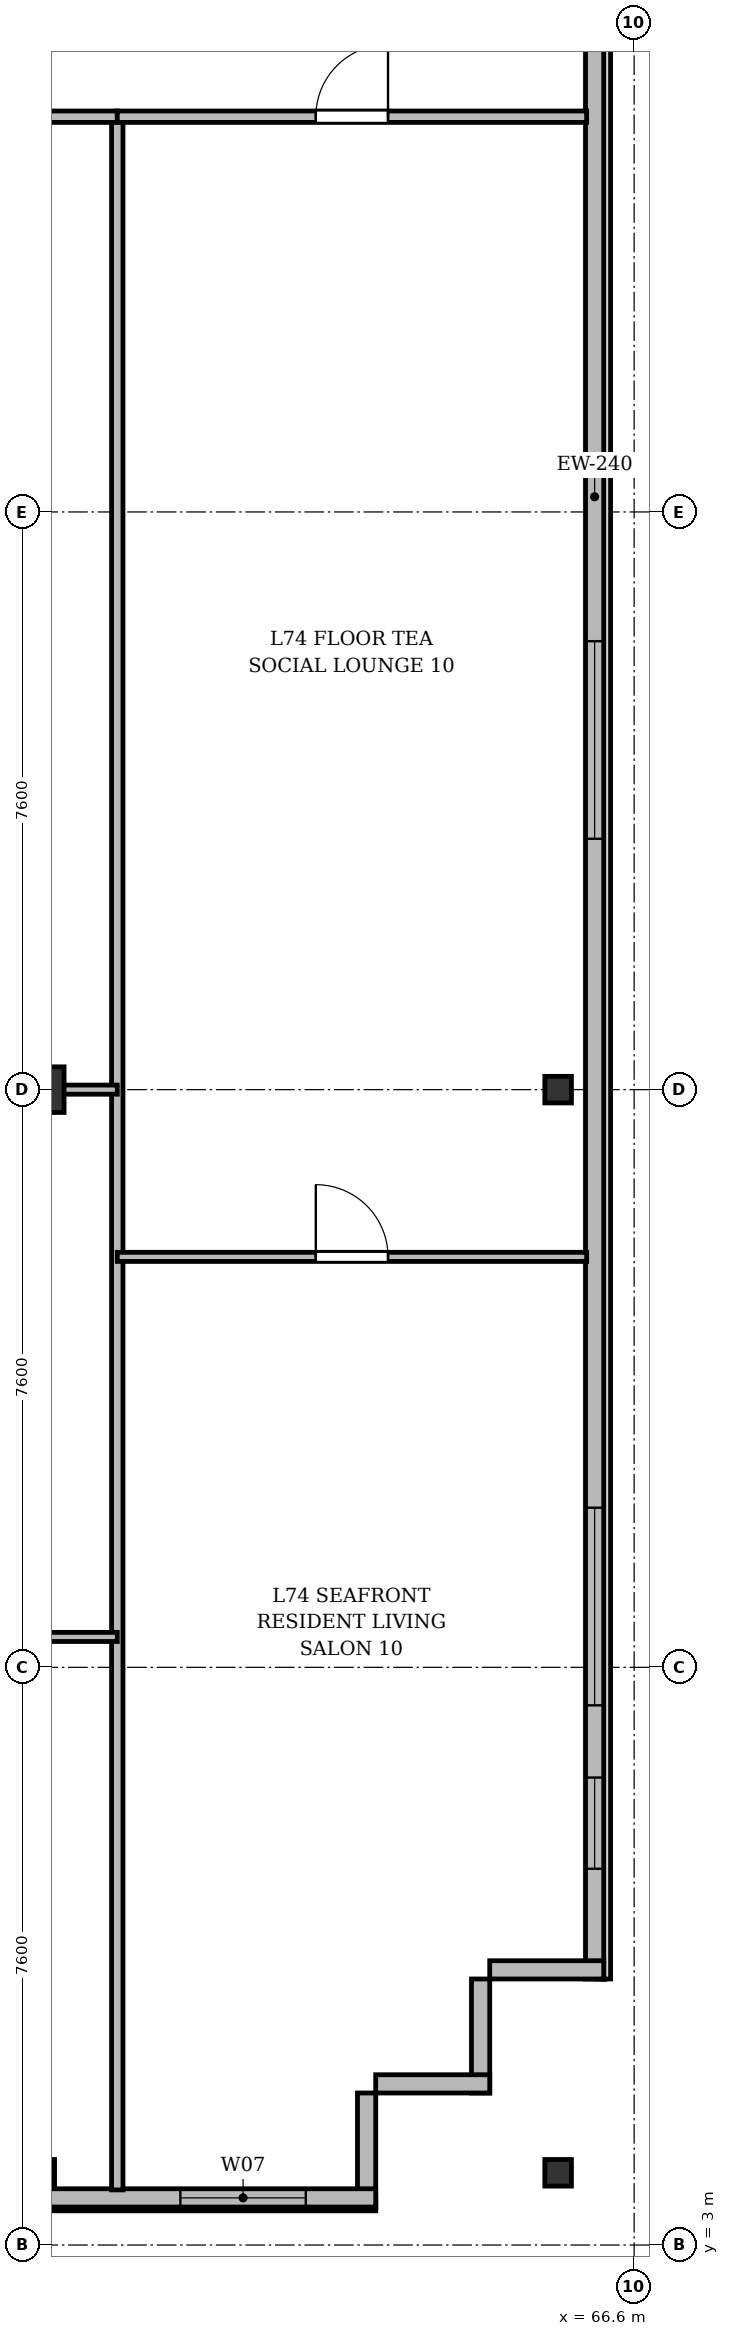
"""IFC4 building model, lengths in metres.
Left out: names, types, materials, properties, quantities, classifications, styles, units other than length and angle.
Written with IfcOpenShell. Run it as: python <this file> out.ifc"""

import sys

from ifc_helpers import new_model, si_unit, direction, frame, frame_2d, origin, origin_2d, place, context, subcontext, project, spatial, rectangle, i_section, extrude, source, transform, mapped, element, fill, save


model = new_model("IFC4")
c1 = context("Model", 3, precision=1e-05, world=origin(), true_north=direction((0.0, 1.0)))
c2 = subcontext(c1, "Body", "Model", "MODEL_VIEW")
j1 = project(units=[si_unit("LENGTHUNIT", "METRE"), si_unit("PLANEANGLEUNIT", "RADIAN")], contexts=[c1])
p1 = place(None, origin())
s1 = spatial("IfcSite", under=j1, at=p1, CompositionType="ELEMENT")
p2 = place(p1, origin())
s2 = spatial("IfcBuilding", under=s1, at=p2, CompositionType="ELEMENT")
p3 = place(p2, frame((0.0, 0.0, 284.7)))
s3 = spatial("IfcBuildingStorey", under=s2, at=p3, CompositionType="ELEMENT", Elevation=284.7)
m1 = source(origin(), c2, "Body", "SweptSolid", [
    extrude(i_section(OverallWidth=0.35, OverallDepth=0.35, WebThickness=0.018, FlangeThickness=0.028, at=origin_2d()), origin(), (0.0, 0.0, 1.0), 3.6),
])
p4 = place(p3, frame((58.8, 3.95, 0.0), z_axis=(0.0, 0.0, 1.0), x_axis=(1.0, 0.0, 0.0)))
e1 = element("IfcColumn", 1, at=p4, inside=s3, PredefinedType="COLUMN", context=c2, shape_type="MappedRepresentation", body=[
    mapped(m1, transform((0.0, 0.0, 0.0), x_axis=(1.0, 0.0, 0.0), y_axis=(0.0, 1.0, 0.0), z_axis=(0.0, 0.0, 1.0), scale=1.0)),
])
m2 = source(origin(), c2, "Body", "SweptSolid", [
    extrude(rectangle(XDim=0.6, YDim=0.6, at=origin_2d()), origin(), (0.0, 0.0, 1.0), 3.6),
])
p5 = place(p3, frame((58.8, 18.2, 0.0), z_axis=(0.0, 0.0, 1.0), x_axis=(1.0, 0.0, 0.0)))
e2 = element("IfcColumn", 2, at=p5, inside=s3, PredefinedType="COLUMN", context=c2, shape_type="MappedRepresentation", body=[
    mapped(m2, transform((0.0, 0.0, 0.0), x_axis=(1.0, 0.0, 0.0), y_axis=(0.0, 1.0, 0.0), z_axis=(0.0, 0.0, 1.0), scale=1.0)),
])
for number, where, z_axis, x_axis in (
    (3, (65.6, 3.95, 0.0), (0.0, 0.0, 1.0), (1.0, 0.0, 0.0)),
    (4, (65.6, 18.2, 0.0), (0.0, 0.0, 1.0), (1.0, 0.0, 0.0)),
):
    element("IfcColumn", number, at=place(p3, frame(where, z_axis=z_axis, x_axis=x_axis)), inside=s3, PredefinedType="COLUMN", context=c2, shape_type="MappedRepresentation", body=[
        mapped(m1, transform((0.0, 0.0, 0.0), x_axis=(1.0, 0.0, 0.0), y_axis=(0.0, 1.0, 0.0), z_axis=(0.0, 0.0, 1.0), scale=1.0)),
    ])
p6 = place(p3, frame((66.08, 45.5, 0.0), z_axis=(0.0, 0.0, 1.0), x_axis=(0.0, -1.0, 0.0)))
e5 = element("IfcWall", 5, at=p6, inside=s3, PredefinedType="SOLIDWALL", context=c2, shape_type="SweptSolid", body=[
    extrude(rectangle(XDim=39.0, YDim=0.24, at=frame_2d((19.5, 0.0))), origin(), (0.0, 0.0, 1.0), 3.37),
])
p7 = place(p6, frame((36.35, 0.0, 0.92)))
e6 = element("IfcOpeningElement", 6, at=p7, cuts=e5, PredefinedType="OPENING", context=c2, shape_type="SweptSolid", body=[
    extrude(rectangle(XDim=1.2, YDim=1.65, at=frame_2d((0.6, 0.825))), frame((0.0, 0.13, 0.0), z_axis=(0.0, -1.0, 0.0), x_axis=(1.0, 0.0, 0.0)), (0.0, 0.0, 1.0), 0.26),
])
p8 = place(p6, frame((32.8, 0.0, 0.92)))
e7 = element("IfcOpeningElement", 7, at=p8, cuts=e5, PredefinedType="OPENING", context=c2, shape_type="SweptSolid", body=[
    extrude(rectangle(XDim=2.6, YDim=1.9, at=frame_2d((1.3, 0.95))), frame((0.0, 0.13, 0.0), z_axis=(0.0, -1.0, 0.0), x_axis=(1.0, 0.0, 0.0)), (0.0, 0.0, 1.0), 0.26),
])
p9 = place(p6, frame((21.4, 0.0, 0.92)))
e8 = element("IfcOpeningElement", 8, at=p9, cuts=e5, PredefinedType="OPENING", context=c2, shape_type="SweptSolid", body=[
    extrude(rectangle(XDim=2.6, YDim=1.9, at=frame_2d((1.3, 0.95))), frame((0.0, 0.13, 0.0), z_axis=(0.0, -1.0, 0.0), x_axis=(1.0, 0.0, 0.0)), (0.0, 0.0, 1.0), 0.26),
])
p10 = place(p6, frame((7.4, 0.0, 0.92)))
e9 = element("IfcOpeningElement", 9, at=p10, cuts=e5, PredefinedType="OPENING", context=c2, shape_type="SweptSolid", body=[
    extrude(rectangle(XDim=2.6, YDim=1.9, at=frame_2d((1.3, 0.95))), frame((0.0, 0.13, 0.0), z_axis=(0.0, -1.0, 0.0), x_axis=(1.0, 0.0, 0.0)), (0.0, 0.0, 1.0), 0.26),
])
p11 = place(p6, frame((1.15, 0.0, 0.92)))
e10 = element("IfcOpeningElement", 10, at=p11, cuts=e5, PredefinedType="OPENING", context=c2, shape_type="SweptSolid", body=[
    extrude(rectangle(XDim=1.2, YDim=1.65, at=frame_2d((0.6, 0.825))), frame((0.0, 0.13, 0.0), z_axis=(0.0, -1.0, 0.0), x_axis=(1.0, 0.0, 0.0)), (0.0, 0.0, 1.0), 0.26),
])
p12 = place(p3, frame((66.2, 6.62, 0.0), z_axis=(0.0, 0.0, 1.0), x_axis=(-1.0, 0.0, 0.0)))
e11 = element("IfcWall", 11, at=p12, inside=s3, PredefinedType="SOLIDWALL", context=c2, shape_type="SweptSolid", body=[
    extrude(rectangle(XDim=1.5, YDim=0.24, at=frame_2d((0.75, 0.0))), origin(), (0.0, 0.0, 1.0), 2.87),
])
for number, where, z_axis, x_axis in (
    (12, (64.58, 6.5, 0.0), (0.0, 0.0, 1.0), (0.0, -1.0, 0.0)),
    (13, (64.7, 5.12, 0.0), (0.0, 0.0, 1.0), (-1.0, 0.0, 0.0)),
):
    element("IfcWall", number, at=place(p3, frame(where, z_axis=z_axis, x_axis=x_axis)), inside=s3, PredefinedType="SOLIDWALL", context=c2, shape_type="SweptSolid", body=[
        extrude(rectangle(XDim=1.5, YDim=0.24, at=frame_2d((0.75, 0.0))), origin(), (0.0, 0.0, 1.0), 3.37),
    ])
p13 = place(p3, frame((63.08, 5.0, 0.0), z_axis=(0.0, 0.0, 1.0), x_axis=(0.0, -1.0, 0.0)))
e14 = element("IfcWall", 14, at=p13, inside=s3, PredefinedType="SOLIDWALL", context=c2, shape_type="SweptSolid", body=[
    extrude(rectangle(XDim=1.5, YDim=0.24, at=frame_2d((0.75, 0.0))), origin(), (0.0, 0.0, 1.0), 2.92),
])
p14 = place(p3, frame((63.2, 3.62, 0.0), z_axis=(0.0, 0.0, 1.0), x_axis=(-1.0, 0.0, 0.0)))
e15 = element("IfcWall", 15, at=p14, inside=s3, PredefinedType="SOLIDWALL", context=c2, shape_type="SweptSolid", body=[
    extrude(rectangle(XDim=52.0, YDim=0.24, at=frame_2d((26.0, 0.0))), origin(), (0.0, 0.0, 1.0), 3.37),
])
p15 = place(p14, frame((0.92, 0.0, 0.9)))
e16 = element("IfcOpeningElement", 16, at=p15, cuts=e15, PredefinedType="OPENING", context=c2, shape_type="SweptSolid", body=[
    extrude(rectangle(XDim=1.65, YDim=1.85, at=frame_2d((0.825, 0.925))), frame((0.0, 0.13, 0.0), z_axis=(0.0, -1.0, 0.0), x_axis=(1.0, 0.0, 0.0)), (0.0, 0.0, 1.0), 0.26),
])
p16 = place(p14, frame((4.793, 0.0, 0.9)))
e17 = element("IfcOpeningElement", 17, at=p16, cuts=e15, PredefinedType="OPENING", context=c2, shape_type="SweptSolid", body=[
    extrude(rectangle(XDim=1.35, YDim=1.5, at=frame_2d((0.675, 0.75))), frame((0.0, 0.13, 0.0), z_axis=(0.0, -1.0, 0.0), x_axis=(1.0, 0.0, 0.0)), (0.0, 0.0, 1.0), 0.26),
])
p17 = place(p14, frame((6.685, 0.0, 0.0)))
e18 = element("IfcOpeningElement", 18, at=p17, cuts=e15, PredefinedType="OPENING", context=c2, shape_type="SweptSolid", body=[
    extrude(rectangle(XDim=1.2, YDim=2.2, at=frame_2d((0.6, 1.1))), frame((0.0, 0.13, 0.0), z_axis=(0.0, -1.0, 0.0), x_axis=(1.0, 0.0, 0.0)), (0.0, 0.0, 1.0), 0.26),
])
p18 = place(p14, frame((9.983, 0.0, 0.9)))
e19 = element("IfcOpeningElement", 19, at=p18, cuts=e15, PredefinedType="OPENING", context=c2, shape_type="SweptSolid", body=[
    extrude(rectangle(XDim=1.5, YDim=1.75, at=frame_2d((0.75, 0.875))), frame((0.0, 0.13, 0.0), z_axis=(0.0, -1.0, 0.0), x_axis=(1.0, 0.0, 0.0)), (0.0, 0.0, 1.0), 0.26),
])
p19 = place(p14, frame((13.2, 0.0, 0.9)))
e20 = element("IfcOpeningElement", 20, at=p19, cuts=e15, PredefinedType="OPENING", context=c2, shape_type="SweptSolid", body=[
    extrude(rectangle(XDim=2.0, YDim=1.95, at=frame_2d((1.0, 0.975))), frame((0.0, 0.13, 0.0), z_axis=(0.0, -1.0, 0.0), x_axis=(1.0, 0.0, 0.0)), (0.0, 0.0, 1.0), 0.26),
])
p20 = place(p14, frame((16.975, 0.0, 0.9)))
e21 = element("IfcOpeningElement", 21, at=p20, cuts=e15, PredefinedType="OPENING", context=c2, shape_type="SweptSolid", body=[
    extrude(rectangle(XDim=1.65, YDim=1.85, at=frame_2d((0.825, 0.925))), frame((0.0, 0.13, 0.0), z_axis=(0.0, -1.0, 0.0), x_axis=(1.0, 0.0, 0.0)), (0.0, 0.0, 1.0), 0.26),
])
p21 = place(p14, frame((21.3, 0.0, 0.9)))
e22 = element("IfcOpeningElement", 22, at=p21, cuts=e15, PredefinedType="OPENING", context=c2, shape_type="SweptSolid", body=[
    extrude(rectangle(XDim=1.8, YDim=1.8, at=frame_2d((0.9, 0.9))), frame((0.0, 0.13, 0.0), z_axis=(0.0, -1.0, 0.0), x_axis=(1.0, 0.0, 0.0)), (0.0, 0.0, 1.0), 0.26),
])
p22 = place(p14, frame((27.7, 0.0, 0.9)))
e23 = element("IfcOpeningElement", 23, at=p22, cuts=e15, PredefinedType="OPENING", context=c2, shape_type="SweptSolid", body=[
    extrude(rectangle(XDim=2.2, YDim=1.8, at=frame_2d((1.1, 0.9))), frame((0.0, 0.13, 0.0), z_axis=(0.0, -1.0, 0.0), x_axis=(1.0, 0.0, 0.0)), (0.0, 0.0, 1.0), 0.26),
])
p23 = place(p14, frame((33.873, 0.0, 0.0)))
e24 = element("IfcOpeningElement", 24, at=p23, cuts=e15, PredefinedType="OPENING", context=c2, shape_type="SweptSolid", body=[
    extrude(rectangle(XDim=1.2, YDim=2.2, at=frame_2d((0.6, 1.1))), frame((0.0, 0.13, 0.0), z_axis=(0.0, -1.0, 0.0), x_axis=(1.0, 0.0, 0.0)), (0.0, 0.0, 1.0), 0.26),
])
p24 = place(p14, frame((36.8, 0.0, 0.9)))
e25 = element("IfcOpeningElement", 25, at=p24, cuts=e15, PredefinedType="OPENING", context=c2, shape_type="SweptSolid", body=[
    extrude(rectangle(XDim=2.0, YDim=1.95, at=frame_2d((1.0, 0.975))), frame((0.0, 0.13, 0.0), z_axis=(0.0, -1.0, 0.0), x_axis=(1.0, 0.0, 0.0)), (0.0, 0.0, 1.0), 0.26),
])
p25 = place(p14, frame((40.475, 0.0, 0.9)))
e26 = element("IfcOpeningElement", 26, at=p25, cuts=e15, PredefinedType="OPENING", context=c2, shape_type="SweptSolid", body=[
    extrude(rectangle(XDim=1.65, YDim=1.85, at=frame_2d((0.825, 0.925))), frame((0.0, 0.13, 0.0), z_axis=(0.0, -1.0, 0.0), x_axis=(1.0, 0.0, 0.0)), (0.0, 0.0, 1.0), 0.26),
])
p26 = place(p14, frame((43.4, 0.0, 0.9)))
e27 = element("IfcOpeningElement", 27, at=p26, cuts=e15, PredefinedType="OPENING", context=c2, shape_type="SweptSolid", body=[
    extrude(rectangle(XDim=1.8, YDim=1.8, at=frame_2d((0.9, 0.9))), frame((0.0, 0.13, 0.0), z_axis=(0.0, -1.0, 0.0), x_axis=(1.0, 0.0, 0.0)), (0.0, 0.0, 1.0), 0.26),
])
p27 = place(p14, frame((45.99, 0.0, 0.9)))
e28 = element("IfcOpeningElement", 28, at=p27, cuts=e15, PredefinedType="OPENING", context=c2, shape_type="SweptSolid", body=[
    extrude(rectangle(XDim=1.2, YDim=1.65, at=frame_2d((0.6, 0.825))), frame((0.0, 0.13, 0.0), z_axis=(0.0, -1.0, 0.0), x_axis=(1.0, 0.0, 0.0)), (0.0, 0.0, 1.0), 0.26),
])
p28 = place(p14, frame((49.605, 0.0, 0.9)))
e29 = element("IfcOpeningElement", 29, at=p28, cuts=e15, PredefinedType="OPENING", context=c2, shape_type="SweptSolid", body=[
    extrude(rectangle(XDim=1.5, YDim=1.75, at=frame_2d((0.75, 0.875))), frame((0.0, 0.13, 0.0), z_axis=(0.0, -1.0, 0.0), x_axis=(1.0, 0.0, 0.0)), (0.0, 0.0, 1.0), 0.26),
])
p29 = place(p3, frame((59.8, 3.725, 0.0), z_axis=(0.0, 0.0, 1.0), x_axis=(0.0, 1.0, 0.0)))
e30 = element("IfcWall", 30, at=p29, inside=s3, PredefinedType="PARTITIONING", context=c2, shape_type="SweptSolid", body=[
    extrude(rectangle(XDim=27.275, YDim=0.15, at=frame_2d((13.637, 0.0))), origin(), (0.0, 0.0, 1.0), 2.92),
])
p30 = place(p3, frame((51.0, 18.2, 0.0), z_axis=(0.0, 0.0, 1.0), x_axis=(1.0, 0.0, 0.0)))
e31 = element("IfcWall", 31, at=p30, inside=s3, PredefinedType="PARTITIONING", context=c2, shape_type="SweptSolid", body=[
    extrude(rectangle(XDim=8.8, YDim=0.12, at=frame_2d((4.4, 0.0))), origin(), (0.0, 0.0, 1.0), 2.92),
])
p31 = place(p30, frame((3.834, 0.0, 0.0)))
e32 = element("IfcOpeningElement", 32, at=p31, cuts=e31, PredefinedType="OPENING", context=c2, shape_type="SweptSolid", body=[
    extrude(rectangle(XDim=0.95, YDim=2.15, at=frame_2d((0.475, 1.075))), frame((0.0, 0.07, 0.0), z_axis=(0.0, -1.0, 0.0), x_axis=(1.0, 0.0, 0.0)), (0.0, 0.0, 1.0), 0.14),
])
p32 = place(p3, frame((51.0, 31.0, 0.0), z_axis=(0.0, 0.0, 1.0), x_axis=(1.0, 0.0, 0.0)))
e33 = element("IfcWall", 33, at=p32, inside=s3, PredefinedType="PARTITIONING", context=c2, shape_type="SweptSolid", body=[
    extrude(rectangle(XDim=8.8, YDim=0.15, at=frame_2d((4.4, 0.0))), origin(), (0.0, 0.0, 1.0), 2.87),
])
p33 = place(p32, frame((5.776, 0.0, 0.0)))
e34 = element("IfcOpeningElement", 34, at=p33, cuts=e33, PredefinedType="OPENING", context=c2, shape_type="SweptSolid", body=[
    extrude(rectangle(XDim=0.95, YDim=2.15, at=frame_2d((0.475, 1.075))), frame((0.0, 0.085, 0.0), z_axis=(0.0, -1.0, 0.0), x_axis=(1.0, 0.0, 0.0)), (0.0, 0.0, 1.0), 0.17),
])
p34 = place(p3, frame((56.867, 11.0, 0.0), z_axis=(0.0, 0.0, 1.0), x_axis=(1.0, 0.0, 0.0)))
e35 = element("IfcWall", 35, at=p34, inside=s3, PredefinedType="PARTITIONING", context=c2, shape_type="SweptSolid", body=[
    extrude(rectangle(XDim=2.933, YDim=0.12, at=frame_2d((1.467, 0.0))), origin(), (0.0, 0.0, 1.0), 2.87),
])
p35 = place(p34, frame((0.991, 0.0, 0.0)))
e36 = element("IfcOpeningElement", 36, at=p35, cuts=e35, PredefinedType="OPENING", context=c2, shape_type="SweptSolid", body=[
    extrude(rectangle(XDim=0.95, YDim=2.15, at=frame_2d((0.475, 1.075))), frame((0.0, 0.07, 0.0), z_axis=(0.0, -1.0, 0.0), x_axis=(1.0, 0.0, 0.0)), (0.0, 0.0, 1.0), 0.14),
])
p36 = place(p3, frame((59.8, 31.0, 0.0), z_axis=(0.0, 0.0, 1.0), x_axis=(1.0, 0.0, 0.0)))
e37 = element("IfcWall", 37, at=p36, inside=s3, PredefinedType="PARTITIONING", context=c2, shape_type="SweptSolid", body=[
    extrude(rectangle(XDim=6.175, YDim=0.15, at=frame_2d((3.087, 0.0))), origin(), (0.0, 0.0, 1.0), 2.87),
])
p37 = place(p36, frame((2.612, 0.0, 0.0)))
e38 = element("IfcOpeningElement", 38, at=p37, cuts=e37, PredefinedType="OPENING", context=c2, shape_type="SweptSolid", body=[
    extrude(rectangle(XDim=0.95, YDim=2.15, at=frame_2d((0.475, 1.075))), frame((0.0, 0.085, 0.0), z_axis=(0.0, -1.0, 0.0), x_axis=(1.0, 0.0, 0.0)), (0.0, 0.0, 1.0), 0.17),
])
p38 = place(p3, frame((59.8, 16.0, 0.0), z_axis=(0.0, 0.0, 1.0), x_axis=(1.0, 0.0, 0.0)))
e39 = element("IfcWall", 39, at=p38, inside=s3, PredefinedType="PARTITIONING", context=c2, shape_type="SweptSolid", body=[
    extrude(rectangle(XDim=6.175, YDim=0.12, at=frame_2d((3.087, 0.0))), origin(), (0.0, 0.0, 1.0), 2.87),
])
p39 = place(p38, frame((2.612, 0.0, 0.0)))
e40 = element("IfcOpeningElement", 40, at=p39, cuts=e39, PredefinedType="OPENING", context=c2, shape_type="SweptSolid", body=[
    extrude(rectangle(XDim=0.95, YDim=2.15, at=frame_2d((0.475, 1.075))), frame((0.0, 0.07, 0.0), z_axis=(0.0, -1.0, 0.0), x_axis=(1.0, 0.0, 0.0)), (0.0, 0.0, 1.0), 0.14),
])
m3 = source(origin(), c2, "Body", "SweptSolid", [
    extrude(rectangle(XDim=1.2, YDim=1.65, at=frame_2d((0.6, 0.825))), frame((0.0, 0.03, 0.0), z_axis=(0.0, -1.0, 0.0), x_axis=(1.0, 0.0, 0.0)), (0.0, 0.0, 1.0), 0.06),
])
p40 = place(p7, origin())
e41 = element("IfcWindow", 41, at=p40, inside=s3, PartitioningType="SINGLE_PANEL", PredefinedType="WINDOW", context=c2, shape_type="MappedRepresentation", body=[
    mapped(m3, transform((0.0, 0.0, 0.0), x_axis=(1.0, 0.0, 0.0), y_axis=(0.0, 1.0, 0.0), z_axis=(0.0, 0.0, 1.0), scale=1.0)),
])
fill(e6, e41)
m4 = source(origin(), c2, "Body", "SweptSolid", [
    extrude(rectangle(XDim=2.6, YDim=1.9, at=frame_2d((1.3, 0.95))), frame((0.0, 0.03, 0.0), z_axis=(0.0, -1.0, 0.0), x_axis=(1.0, 0.0, 0.0)), (0.0, 0.0, 1.0), 0.06),
])
p41 = place(p8, origin())
e42 = element("IfcWindow", 42, at=p41, inside=s3, PartitioningType="SINGLE_PANEL", PredefinedType="WINDOW", context=c2, shape_type="MappedRepresentation", body=[
    mapped(m4, transform((0.0, 0.0, 0.0), x_axis=(1.0, 0.0, 0.0), y_axis=(0.0, 1.0, 0.0), z_axis=(0.0, 0.0, 1.0), scale=1.0)),
])
fill(e7, e42)
p42 = place(p9, origin())
e43 = element("IfcWindow", 43, at=p42, inside=s3, PartitioningType="SINGLE_PANEL", PredefinedType="WINDOW", context=c2, shape_type="MappedRepresentation", body=[
    mapped(m4, transform((0.0, 0.0, 0.0), x_axis=(1.0, 0.0, 0.0), y_axis=(0.0, 1.0, 0.0), z_axis=(0.0, 0.0, 1.0), scale=1.0)),
])
fill(e8, e43)
m5 = source(origin(), c2, "Body", "SweptSolid", [
    extrude(rectangle(XDim=1.65, YDim=1.85, at=frame_2d((0.825, 0.925))), frame((0.0, 0.03, 0.0), z_axis=(0.0, -1.0, 0.0), x_axis=(1.0, 0.0, 0.0)), (0.0, 0.0, 1.0), 0.06),
])
p43 = place(p15, origin())
e44 = element("IfcWindow", 44, at=p43, inside=s3, PartitioningType="SINGLE_PANEL", PredefinedType="WINDOW", context=c2, shape_type="MappedRepresentation", body=[
    mapped(m5, transform((0.0, 0.0, 0.0), x_axis=(1.0, 0.0, 0.0), y_axis=(0.0, 1.0, 0.0), z_axis=(0.0, 0.0, 1.0), scale=1.0)),
])
fill(e16, e44)
m6 = source(origin(), c2, "Body", "SweptSolid", [
    extrude(rectangle(XDim=0.95, YDim=2.15, at=frame_2d((0.475, 1.075))), frame((0.0, 0.025, 0.0), z_axis=(0.0, -1.0, 0.0), x_axis=(1.0, 0.0, 0.0)), (0.0, 0.0, 1.0), 0.05),
])
p44 = place(p37, origin())
e45 = element("IfcDoor", 45, at=p44, inside=s3, OperationType="SINGLE_SWING_RIGHT", PredefinedType="DOOR", context=c2, shape_type="MappedRepresentation", body=[
    mapped(m6, transform((0.0, 0.0, 0.0), x_axis=(1.0, 0.0, 0.0), y_axis=(0.0, 1.0, 0.0), z_axis=(0.0, 0.0, 1.0), scale=1.0)),
])
fill(e38, e45)
p45 = place(p39, origin())
e46 = element("IfcDoor", 46, at=p45, inside=s3, OperationType="SINGLE_SWING_LEFT", PredefinedType="DOOR", context=c2, shape_type="MappedRepresentation", body=[
    mapped(m6, transform((0.0, 0.0, 0.0), x_axis=(1.0, 0.0, 0.0), y_axis=(0.0, 1.0, 0.0), z_axis=(0.0, 0.0, 1.0), scale=1.0)),
])
fill(e40, e46)
save(model, sys.argv[1])
